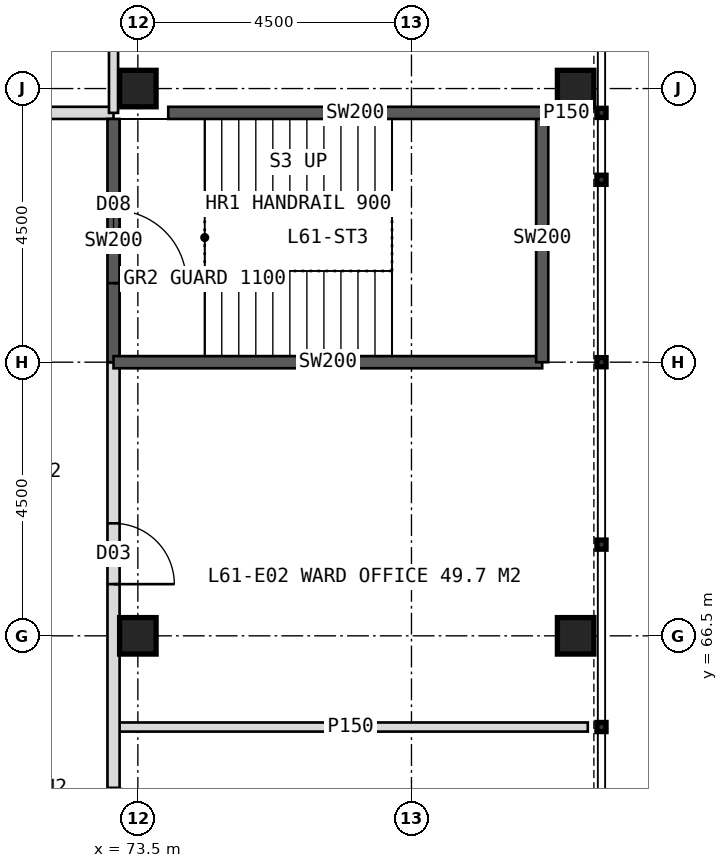
"""IFC4 building model, lengths in metres.
Left out: names, types, materials, properties, quantities, classifications, styles, units other than length and angle.
Written with IfcOpenShell. Run it as: python <this file> out.ifc"""

import sys

from ifc_helpers import new_model, si_unit, direction, frame, frame_2d, origin, origin_2d, place, context, subcontext, project, spatial, rectangle, hollow_rectangle, extrude, element, fill, save


model = new_model("IFC4")
c1 = context("Model", 3, precision=1e-05, world=origin(), true_north=direction((0.0, 1.0)))
c2 = subcontext(c1, "Body", "Model", "MODEL_VIEW")
j1 = project(units=[si_unit("LENGTHUNIT", "METRE"), si_unit("PLANEANGLEUNIT", "RADIAN")], contexts=[c1])
p1 = place(None, origin())
s1 = spatial("IfcSite", under=j1, at=p1, CompositionType="ELEMENT")
p2 = place(p1, origin())
s2 = spatial("IfcBuilding", under=s1, at=p2, CompositionType="ELEMENT")
p3 = place(p2, frame((0.0, 0.0, 254.0)))
s3 = spatial("IfcBuildingStorey", under=s2, at=p3, CompositionType="ELEMENT", Elevation=254.0)
for number, where, z_axis, x_axis in (
    (1, (73.5, 75.5, 0.0), (0.0, 0.0, 1.0), (1.0, 0.0, 0.0)),
    (2, (73.5, 66.5, 0.0), (0.0, 0.0, 1.0), (1.0, 0.0, 0.0)),
    (3, (80.7, 66.5, 0.0), (0.0, 0.0, 1.0), (1.0, 0.0, 0.0)),
    (4, (80.7, 75.5, 0.0), (0.0, 0.0, 1.0), (1.0, 0.0, 0.0)),
):
    element("IfcColumn", number, at=place(p3, frame(where, z_axis=z_axis, x_axis=x_axis)), inside=s3, PredefinedType="COLUMN", context=c2, shape_type="SweptSolid", body=[
        extrude(hollow_rectangle(XDim=0.6, YDim=0.6, WallThickness=0.04, at=origin_2d()), origin(), (0.0, 0.0, 1.0), 4.0),
    ])
p4 = place(p3, frame((46.9, 75.1, 0.0), z_axis=(0.0, 0.0, 1.0), x_axis=(1.0, 0.0, 0.0)))
e5 = element("IfcWall", 5, at=p4, inside=s3, PredefinedType="PARTITIONING", context=c2, shape_type="SweptSolid", body=[
    extrude(rectangle(XDim=26.2, YDim=0.2, at=frame_2d((13.1, 0.0))), origin(), (0.0, 0.0, 1.0), 3.75),
])
p5 = place(p4, frame((1.75, 0.0, 0.0)))
e6 = element("IfcOpeningElement", 6, at=p5, cuts=e5, PredefinedType="OPENING", context=c2, shape_type="SweptSolid", body=[
    extrude(rectangle(XDim=1.2, YDim=2.2, at=frame_2d((0.6, 1.1))), frame((0.0, 0.11, 0.0), z_axis=(0.0, -1.0, 0.0), x_axis=(1.0, 0.0, 0.0)), (0.0, 0.0, 1.0), 0.22),
])
p6 = place(p4, frame((6.75, 0.0, 0.0)))
e7 = element("IfcOpeningElement", 7, at=p6, cuts=e5, PredefinedType="OPENING", context=c2, shape_type="SweptSolid", body=[
    extrude(rectangle(XDim=1.0, YDim=2.1, at=frame_2d((0.5, 1.05))), frame((0.0, 0.11, 0.0), z_axis=(0.0, -1.0, 0.0), x_axis=(1.0, 0.0, 0.0)), (0.0, 0.0, 1.0), 0.22),
])
p7 = place(p4, frame((12.75, 0.0, 0.0)))
e8 = element("IfcOpeningElement", 8, at=p7, cuts=e5, PredefinedType="OPENING", context=c2, shape_type="SweptSolid", body=[
    extrude(rectangle(XDim=1.2, YDim=2.2, at=frame_2d((0.6, 1.1))), frame((0.0, 0.11, 0.0), z_axis=(0.0, -1.0, 0.0), x_axis=(1.0, 0.0, 0.0)), (0.0, 0.0, 1.0), 0.22),
])
p8 = place(p4, frame((20.45, 0.0, 0.0)))
e9 = element("IfcOpeningElement", 9, at=p8, cuts=e5, PredefinedType="OPENING", context=c2, shape_type="SweptSolid", body=[
    extrude(rectangle(XDim=0.9, YDim=2.1, at=frame_2d((0.45, 1.05))), frame((0.0, 0.11, 0.0), z_axis=(0.0, -1.0, 0.0), x_axis=(1.0, 0.0, 0.0)), (0.0, 0.0, 1.0), 0.22),
])
p9 = place(p4, frame((18.45, 0.0, 0.0)))
e10 = element("IfcOpeningElement", 10, at=p9, cuts=e5, PredefinedType="OPENING", context=c2, shape_type="SweptSolid", body=[
    extrude(rectangle(XDim=1.0, YDim=2.1, at=frame_2d((0.5, 1.05))), frame((0.0, 0.11, 0.0), z_axis=(0.0, -1.0, 0.0), x_axis=(1.0, 0.0, 0.0)), (0.0, 0.0, 1.0), 0.22),
])
p10 = place(p4, frame((23.65, 0.0, 0.0)))
e11 = element("IfcOpeningElement", 11, at=p10, cuts=e5, PredefinedType="OPENING", context=c2, shape_type="SweptSolid", body=[
    extrude(rectangle(XDim=1.0, YDim=2.1, at=frame_2d((0.5, 1.05))), frame((0.0, 0.11, 0.0), z_axis=(0.0, -1.0, 0.0), x_axis=(1.0, 0.0, 0.0)), (0.0, 0.0, 1.0), 0.22),
])
p11 = place(p3, frame((73.1, 75.1, 0.0), z_axis=(0.0, 0.0, 1.0), x_axis=(0.0, 1.0, 0.0)))
e12 = element("IfcWall", 12, at=p11, inside=s3, PredefinedType="PARTITIONING", context=c2, shape_type="SweptSolid", body=[
    extrude(rectangle(XDim=7.8, YDim=0.15, at=frame_2d((3.9, 0.0))), origin(), (0.0, 0.0, 1.0), 3.75),
])
p12 = place(p11, frame((2.7, 0.0, 0.0)))
e13 = element("IfcOpeningElement", 13, at=p12, cuts=e12, PredefinedType="OPENING", context=c2, shape_type="SweptSolid", body=[
    extrude(rectangle(XDim=1.0, YDim=2.1, at=frame_2d((0.5, 1.05))), frame((0.0, 0.085, 0.0), z_axis=(0.0, -1.0, 0.0), x_axis=(1.0, 0.0, 0.0)), (0.0, 0.0, 1.0), 0.17),
])
p13 = place(p3, frame((73.1, 65.0, 0.0), z_axis=(0.0, 0.0, 1.0), x_axis=(1.0, 0.0, 0.0)))
e14 = element("IfcWall", 14, at=p13, inside=s3, PredefinedType="PARTITIONING", context=c2, shape_type="SweptSolid", body=[
    extrude(rectangle(XDim=7.8, YDim=0.15, at=frame_2d((3.9, 0.0))), origin(), (0.0, 0.0, 1.0), 3.75),
])
p14 = place(p3, frame((73.1, 71.0, 0.0), z_axis=(0.0, 0.0, 1.0), x_axis=(0.0, -1.0, 0.0)))
e15 = element("IfcWall", 15, at=p14, inside=s3, PredefinedType="PARTITIONING", context=c2, shape_type="SweptSolid", body=[
    extrude(rectangle(XDim=22.1, YDim=0.2, at=frame_2d((11.05, 0.0))), origin(), (0.0, 0.0, 1.0), 3.75),
])
p15 = place(p14, frame((2.65, 0.0, 0.0)))
e16 = element("IfcOpeningElement", 16, at=p15, cuts=e15, PredefinedType="OPENING", context=c2, shape_type="SweptSolid", body=[
    extrude(rectangle(XDim=1.0, YDim=2.1, at=frame_2d((0.5, 1.05))), frame((0.0, 0.11, 0.0), z_axis=(0.0, -1.0, 0.0), x_axis=(1.0, 0.0, 0.0)), (0.0, 0.0, 1.0), 0.22),
])
p16 = place(p14, frame((7.0, 0.0, 0.0)))
e17 = element("IfcOpeningElement", 17, at=p16, cuts=e15, PredefinedType="OPENING", context=c2, shape_type="SweptSolid", body=[
    extrude(rectangle(XDim=1.0, YDim=2.1, at=frame_2d((0.5, 1.05))), frame((0.0, 0.11, 0.0), z_axis=(0.0, -1.0, 0.0), x_axis=(1.0, 0.0, 0.0)), (0.0, 0.0, 1.0), 0.22),
])
p17 = place(p14, frame((14.35, 0.0, 0.0)))
e18 = element("IfcOpeningElement", 18, at=p17, cuts=e15, PredefinedType="OPENING", context=c2, shape_type="SweptSolid", body=[
    extrude(rectangle(XDim=1.2, YDim=2.2, at=frame_2d((0.6, 1.1))), frame((0.0, 0.11, 0.0), z_axis=(0.0, -1.0, 0.0), x_axis=(1.0, 0.0, 0.0)), (0.0, 0.0, 1.0), 0.22),
])
p18 = place(p14, frame((19.15, 0.0, 0.0)))
e19 = element("IfcOpeningElement", 19, at=p18, cuts=e15, PredefinedType="OPENING", context=c2, shape_type="SweptSolid", body=[
    extrude(rectangle(XDim=1.2, YDim=2.2, at=frame_2d((0.6, 1.1))), frame((0.0, 0.11, 0.0), z_axis=(0.0, -1.0, 0.0), x_axis=(1.0, 0.0, 0.0)), (0.0, 0.0, 1.0), 0.22),
])
p19 = place(p3, frame((80.2, 75.1, 0.0), z_axis=(0.0, 0.0, 1.0), x_axis=(1.0, 0.0, 0.0)))
e20 = element("IfcWall", 20, at=p19, inside=s3, PredefinedType="PARTITIONING", context=c2, shape_type="SweptSolid", body=[
    extrude(rectangle(XDim=0.7, YDim=0.15, at=frame_2d((0.35, 0.0))), origin(), (0.0, 0.0, 1.0), 3.75),
])
p20 = place(p3, frame((73.1, 75.0, 0.0), z_axis=(0.0, 0.0, 1.0), x_axis=(0.0, -1.0, 0.0)))
e21 = element("IfcWall", 21, at=p20, inside=s3, PredefinedType="SOLIDWALL", context=c2, shape_type="SweptSolid", body=[
    extrude(rectangle(XDim=4.0, YDim=0.2, at=frame_2d((2.0, 0.0))), origin(), (0.0, 0.0, 1.0), 3.75),
])
p21 = place(p20, frame((1.5, 0.0, 0.0)))
e22 = element("IfcOpeningElement", 22, at=p21, cuts=e21, PredefinedType="OPENING", context=c2, shape_type="SweptSolid", body=[
    extrude(rectangle(XDim=1.2, YDim=2.1, at=frame_2d((0.6, 1.05))), frame((0.0, 0.11, 0.0), z_axis=(0.0, -1.0, 0.0), x_axis=(1.0, 0.0, 0.0)), (0.0, 0.0, 1.0), 0.22),
])
p22 = place(p3, frame((73.1, 71.0, 0.0), z_axis=(0.0, 0.0, 1.0), x_axis=(1.0, 0.0, 0.0)))
e23 = element("IfcWall", 23, at=p22, inside=s3, PredefinedType="SOLIDWALL", context=c2, shape_type="SweptSolid", body=[
    extrude(rectangle(XDim=7.05, YDim=0.2, at=frame_2d((3.525, 0.0))), origin(), (0.0, 0.0, 1.0), 3.75),
])
p23 = place(p3, frame((80.15, 71.0, 0.0), z_axis=(0.0, 0.0, 1.0), x_axis=(0.0, 1.0, 0.0)))
e24 = element("IfcWall", 24, at=p23, inside=s3, PredefinedType="SOLIDWALL", context=c2, shape_type="SweptSolid", body=[
    extrude(rectangle(XDim=4.1, YDim=0.2, at=frame_2d((2.05, 0.0))), origin(), (0.0, 0.0, 1.0), 3.75),
])
p24 = place(p3, frame((74.0, 75.1, 0.0), z_axis=(0.0, 0.0, 1.0), x_axis=(1.0, 0.0, 0.0)))
e25 = element("IfcWall", 25, at=p24, inside=s3, PredefinedType="SOLIDWALL", context=c2, shape_type="SweptSolid", body=[
    extrude(rectangle(XDim=6.15, YDim=0.2, at=frame_2d((3.075, 0.0))), origin(), (0.0, 0.0, 1.0), 3.75),
])
p25 = place(p15, origin())
e26 = element("IfcDoor", 26, at=p25, inside=s3, OperationType="SINGLE_SWING_RIGHT", PredefinedType="DOOR", context=c2, shape_type="SweptSolid", body=[
    extrude(rectangle(XDim=1.0, YDim=2.1, at=frame_2d((0.5, 1.05))), frame((0.0, 0.025, 0.0), z_axis=(0.0, -1.0, 0.0), x_axis=(1.0, 0.0, 0.0)), (0.0, 0.0, 1.0), 0.05),
])
fill(e16, e26)
p26 = place(p21, origin())
e27 = element("IfcDoor", 27, at=p26, inside=s3, OperationType="SINGLE_SWING_RIGHT", PredefinedType="DOOR", context=c2, shape_type="SweptSolid", body=[
    extrude(rectangle(XDim=1.2, YDim=2.1, at=frame_2d((0.6, 1.05))), frame((0.0, 0.025, 0.0), z_axis=(0.0, -1.0, 0.0), x_axis=(1.0, 0.0, 0.0)), (0.0, 0.0, 1.0), 0.05),
])
fill(e22, e27)
save(model, sys.argv[1])
